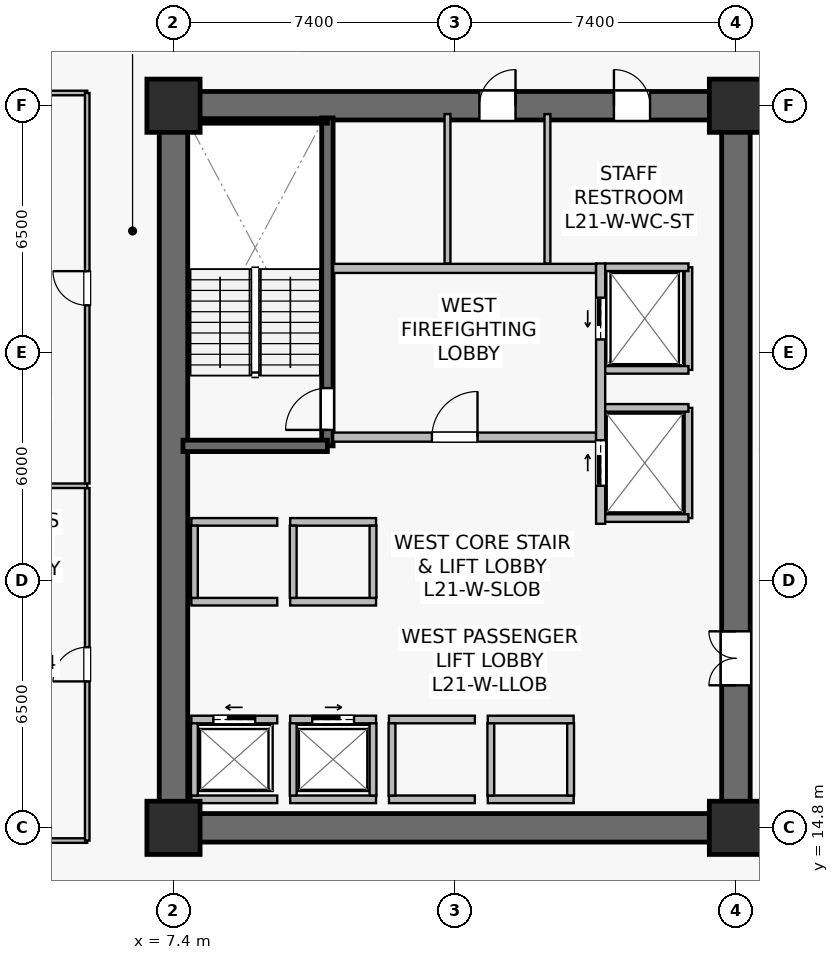
"""IFC4 building model, lengths in metres.
Left out: names, types, materials, properties, quantities, classifications, styles, units other than length and angle.
Written with IfcOpenShell. Run it as: python <this file> out.ifc"""

import sys

from ifc_helpers import new_model, si_unit, direction, frame, frame_2d, origin, origin_2d, place, context, subcontext, project, spatial, rectangle, extrude, source, transform, mapped, element, fill, save


model = new_model("IFC4")
c1 = context("Model", 3, precision=1e-05, world=origin(), true_north=direction((0.0, 1.0)))
c2 = subcontext(c1, "Body", "Model", "MODEL_VIEW")
j1 = project(units=[si_unit("LENGTHUNIT", "METRE"), si_unit("PLANEANGLEUNIT", "RADIAN")], contexts=[c1])
p1 = place(None, origin())
s1 = spatial("IfcSite", under=j1, at=p1, CompositionType="ELEMENT")
p2 = place(p1, origin())
s2 = spatial("IfcBuilding", under=s1, at=p2, CompositionType="ELEMENT")
p3 = place(p2, frame((0.0, 0.0, 86.7)))
s3 = spatial("IfcBuildingStorey", under=s2, at=p3, CompositionType="ELEMENT", Elevation=86.7)
p4 = place(p3, frame((7.025, 14.8, 0.0), z_axis=(0.0, 0.0, 1.0), x_axis=(1.0, 0.0, 0.0)))
e1 = element("IfcWall", 1, at=p4, inside=s3, PredefinedType="SHEAR", context=c2, shape_type="SweptSolid", body=[
    extrude(rectangle(XDim=15.55, YDim=0.75, at=frame_2d((7.775, 0.0))), origin(), (0.0, 0.0, 1.0), 3.78),
])
p5 = place(p3, frame((7.025, 33.8, 0.0), z_axis=(0.0, 0.0, 1.0), x_axis=(1.0, 0.0, 0.0)))
e2 = element("IfcWall", 2, at=p5, inside=s3, PredefinedType="SHEAR", context=c2, shape_type="SweptSolid", body=[
    extrude(rectangle(XDim=15.55, YDim=0.75, at=frame_2d((7.775, 0.0))), origin(), (0.0, 0.0, 1.0), 3.78),
])
p6 = place(p5, frame((8.425, 0.0, 0.0)))
e3 = element("IfcOpeningElement", 3, at=p6, cuts=e2, PredefinedType="OPENING", context=c2, shape_type="SweptSolid", body=[
    extrude(rectangle(XDim=0.95, YDim=2.15, at=frame_2d((0.475, 1.075))), frame((0.0, 0.385, 0.0), z_axis=(0.0, -1.0, 0.0), x_axis=(1.0, 0.0, 0.0)), (0.0, 0.0, 1.0), 0.77),
])
p7 = place(p5, frame((11.965, 0.0, 0.0)))
e4 = element("IfcOpeningElement", 4, at=p7, cuts=e2, PredefinedType="OPENING", context=c2, shape_type="SweptSolid", body=[
    extrude(rectangle(XDim=0.95, YDim=2.15, at=frame_2d((0.475, 1.075))), frame((0.0, 0.385, 0.0), z_axis=(0.0, -1.0, 0.0), x_axis=(1.0, 0.0, 0.0)), (0.0, 0.0, 1.0), 0.77),
])
p8 = place(p3, frame((7.4, 15.175, 0.0), z_axis=(0.0, 0.0, 1.0), x_axis=(0.0, 1.0, 0.0)))
e5 = element("IfcWall", 5, at=p8, inside=s3, PredefinedType="SHEAR", context=c2, shape_type="SweptSolid", body=[
    extrude(rectangle(XDim=18.25, YDim=0.75, at=frame_2d((9.125, 0.0))), origin(), (0.0, 0.0, 1.0), 3.78),
])
p9 = place(p3, frame((22.2, 15.175, 0.0), z_axis=(0.0, 0.0, 1.0), x_axis=(0.0, 1.0, 0.0)))
e6 = element("IfcWall", 6, at=p9, inside=s3, PredefinedType="SHEAR", context=c2, shape_type="SweptSolid", body=[
    extrude(rectangle(XDim=18.25, YDim=0.75, at=frame_2d((9.125, 0.0))), origin(), (0.0, 0.0, 1.0), 3.78),
])
p10 = place(p9, frame((3.375, 0.0, 0.0)))
e7 = element("IfcOpeningElement", 7, at=p10, cuts=e6, PredefinedType="OPENING", context=c2, shape_type="SweptSolid", body=[
    extrude(rectangle(XDim=1.42, YDim=2.2, at=frame_2d((0.71, 1.1))), frame((0.0, 0.385, 0.0), z_axis=(0.0, -1.0, 0.0), x_axis=(1.0, 0.0, 0.0)), (0.0, 0.0, 1.0), 0.77),
])
p11 = place(p3, frame((11.45, 24.85, 0.0), z_axis=(0.0, 0.0, 1.0), x_axis=(0.0, 1.0, 0.0)))
e8 = element("IfcWall", 8, at=p11, inside=s3, PredefinedType="SHEAR", context=c2, shape_type="SweptSolid", body=[
    extrude(rectangle(XDim=8.63, YDim=0.3, at=frame_2d((4.315, 0.0))), origin(), (0.0, 0.0, 1.0), 3.78),
])
p12 = place(p11, frame((0.42, 0.0, 0.0)))
e9 = element("IfcOpeningElement", 9, at=p12, cuts=e8, PredefinedType="OPENING", context=c2, shape_type="SweptSolid", body=[
    extrude(rectangle(XDim=1.1, YDim=2.15, at=frame_2d((0.55, 1.075))), frame((0.0, 0.16, 0.0), z_axis=(0.0, -1.0, 0.0), x_axis=(1.0, 0.0, 0.0)), (0.0, 0.0, 1.0), 0.32),
])
p13 = place(p3, frame((7.65, 24.85, 0.0), z_axis=(0.0, 0.0, 1.0), x_axis=(1.0, 0.0, 0.0)))
e10 = element("IfcWall", 10, at=p13, inside=s3, PredefinedType="SHEAR", context=c2, shape_type="SweptSolid", body=[
    extrude(rectangle(XDim=3.8, YDim=0.3, at=frame_2d((1.9, 0.0))), origin(), (0.0, 0.0, 1.0), 3.78),
])
p14 = place(p3, frame((7.73, 33.4, 0.0), z_axis=(0.0, 0.0, 1.0), x_axis=(1.0, 0.0, 0.0)))
e11 = element("IfcWall", 11, at=p14, inside=s3, PredefinedType="SOLIDWALL", context=c2, shape_type="SweptSolid", body=[
    extrude(rectangle(XDim=3.72, YDim=0.12, at=frame_2d((1.86, 0.0))), origin(), (0.0, 0.0, 1.0), 3.78),
])
m1 = source(origin(), c2, "Body", "SweptSolid", [
    extrude(rectangle(XDim=1.4, YDim=1.4, at=origin_2d()), origin(), (0.0, 0.0, 1.0), 4.1),
])
for number, where, z_axis, x_axis in (
    (12, (7.4, 14.8, 0.0), (0.0, 0.0, 1.0), (1.0, 0.0, 0.0)),
    (13, (22.2, 14.8, 0.0), (0.0, 0.0, 1.0), (1.0, 0.0, 0.0)),
    (14, (7.4, 33.8, 0.0), (0.0, 0.0, 1.0), (1.0, 0.0, 0.0)),
    (15, (22.2, 33.8, 0.0), (0.0, 0.0, 1.0), (1.0, 0.0, 0.0)),
):
    element("IfcColumn", number, at=place(p3, frame(where, z_axis=z_axis, x_axis=x_axis)), inside=s3, PredefinedType="COLUMN", context=c2, shape_type="MappedRepresentation", body=[
        mapped(m1, transform((0.0, 0.0, 0.0), scale=1.0)),
    ])
p15 = place(p3, frame((11.6, 25.08, 0.0), z_axis=(0.0, 0.0, 1.0), x_axis=(1.0, 0.0, 0.0)))
e16 = element("IfcWall", 16, at=p15, inside=s3, PredefinedType="SOLIDWALL", context=c2, shape_type="SweptSolid", body=[
    extrude(rectangle(XDim=6.92, YDim=0.24, at=frame_2d((3.46, 0.0))), origin(), (0.0, 0.0, 1.0), 3.115),
])
p16 = place(p15, frame((2.6, 0.0, 0.0)))
e17 = element("IfcOpeningElement", 17, at=p16, cuts=e16, PredefinedType="OPENING", context=c2, shape_type="SweptSolid", body=[
    extrude(rectangle(XDim=1.2, YDim=2.16, at=frame_2d((0.6, 1.08))), frame((0.0, 0.13, 0.0), z_axis=(0.0, -1.0, 0.0), x_axis=(1.0, 0.0, 0.0)), (0.0, 0.0, 1.0), 0.26),
])
p17 = place(p3, frame((11.6, 29.52, 0.0), z_axis=(0.0, 0.0, 1.0), x_axis=(1.0, 0.0, 0.0)))
e18 = element("IfcWall", 18, at=p17, inside=s3, PredefinedType="SOLIDWALL", context=c2, shape_type="SweptSolid", body=[
    extrude(rectangle(XDim=6.92, YDim=0.24, at=frame_2d((3.46, 0.0))), origin(), (0.0, 0.0, 1.0), 3.115),
])
p18 = place(p3, frame((18.64, 22.8, 0.0), z_axis=(0.0, 0.0, 1.0), x_axis=(0.0, 1.0, 0.0)))
e19 = element("IfcWall", 19, at=p18, inside=s3, PredefinedType="SOLIDWALL", context=c2, shape_type="SweptSolid", body=[
    extrude(rectangle(XDim=6.85, YDim=0.24, at=frame_2d((3.425, 0.0))), origin(), (0.0, 0.0, 1.0), 2.865),
])
p19 = place(p18, frame((4.85, 0.0, 0.0)))
e20 = element("IfcOpeningElement", 20, at=p19, cuts=e19, PredefinedType="OPENING", context=c2, shape_type="SweptSolid", body=[
    extrude(rectangle(XDim=1.1, YDim=2.22, at=frame_2d((0.55, 1.11))), frame((0.0, 0.13, 0.0), z_axis=(0.0, -1.0, 0.0), x_axis=(1.0, 0.0, 0.0)), (0.0, 0.0, 1.0), 0.26),
])
p20 = place(p18, frame((1.0, 0.0, 0.0)))
e21 = element("IfcOpeningElement", 21, at=p20, cuts=e19, PredefinedType="OPENING", context=c2, shape_type="SweptSolid", body=[
    extrude(rectangle(XDim=1.2, YDim=2.22, at=frame_2d((0.6, 1.11))), frame((0.0, 0.13, 0.0), z_axis=(0.0, -1.0, 0.0), x_axis=(1.0, 0.0, 0.0)), (0.0, 0.0, 1.0), 0.26),
])
p21 = place(p3, frame((7.87, 17.65, 0.0), z_axis=(0.0, 0.0, 1.0), x_axis=(1.0, 0.0, 0.0)))
e22 = element("IfcWall", 22, at=p21, inside=s3, PredefinedType="SOLIDWALL", context=c2, shape_type="SweptSolid", body=[
    extrude(rectangle(XDim=2.26, YDim=0.2, at=frame_2d((1.13, 0.0))), origin(), (0.0, 0.0, 1.0), 3.78),
])
p22 = place(p21, frame((0.58, 0.0, 0.0)))
e23 = element("IfcOpeningElement", 23, at=p22, cuts=e22, PredefinedType="OPENING", context=c2, shape_type="SweptSolid", body=[
    extrude(rectangle(XDim=1.1, YDim=2.22, at=frame_2d((0.55, 1.11))), frame((0.0, 0.11, 0.0), z_axis=(0.0, -1.0, 0.0), x_axis=(1.0, 0.0, 0.0)), (0.0, 0.0, 1.0), 0.22),
])
p23 = place(p3, frame((7.87, 15.55, 0.0), z_axis=(0.0, 0.0, 1.0), x_axis=(1.0, 0.0, 0.0)))
e24 = element("IfcWall", 24, at=p23, inside=s3, PredefinedType="SOLIDWALL", context=c2, shape_type="SweptSolid", body=[
    extrude(rectangle(XDim=2.26, YDim=0.2, at=frame_2d((1.13, 0.0))), origin(), (0.0, 0.0, 1.0), 3.78),
])
p24 = place(p3, frame((7.95, 15.65, 0.0), z_axis=(0.0, 0.0, 1.0), x_axis=(0.0, 1.0, 0.0)))
e25 = element("IfcWall", 25, at=p24, inside=s3, PredefinedType="SOLIDWALL", context=c2, shape_type="SweptSolid", body=[
    extrude(rectangle(XDim=1.9, YDim=0.18, at=frame_2d((0.95, 0.0))), origin(), (0.0, 0.0, 1.0), 3.78),
])
p25 = place(p3, frame((10.47, 17.65, 0.0), z_axis=(0.0, 0.0, 1.0), x_axis=(1.0, 0.0, 0.0)))
e26 = element("IfcWall", 26, at=p25, inside=s3, PredefinedType="SOLIDWALL", context=c2, shape_type="SweptSolid", body=[
    extrude(rectangle(XDim=2.26, YDim=0.2, at=frame_2d((1.13, 0.0))), origin(), (0.0, 0.0, 1.0), 3.78),
])
p26 = place(p25, frame((0.58, 0.0, 0.0)))
e27 = element("IfcOpeningElement", 27, at=p26, cuts=e26, PredefinedType="OPENING", context=c2, shape_type="SweptSolid", body=[
    extrude(rectangle(XDim=1.1, YDim=2.22, at=frame_2d((0.55, 1.11))), frame((0.0, 0.11, 0.0), z_axis=(0.0, -1.0, 0.0), x_axis=(1.0, 0.0, 0.0)), (0.0, 0.0, 1.0), 0.22),
])
p27 = place(p3, frame((10.47, 15.55, 0.0), z_axis=(0.0, 0.0, 1.0), x_axis=(1.0, 0.0, 0.0)))
e28 = element("IfcWall", 28, at=p27, inside=s3, PredefinedType="SOLIDWALL", context=c2, shape_type="SweptSolid", body=[
    extrude(rectangle(XDim=2.26, YDim=0.2, at=frame_2d((1.13, 0.0))), origin(), (0.0, 0.0, 1.0), 3.78),
])
for number, where, z_axis, x_axis in (
    (29, (10.55, 15.65, 0.0), (0.0, 0.0, 1.0), (0.0, 1.0, 0.0)),
    (30, (12.65, 15.65, 0.0), (0.0, 0.0, 1.0), (0.0, 1.0, 0.0)),
):
    element("IfcWall", number, at=place(p3, frame(where, z_axis=z_axis, x_axis=x_axis)), inside=s3, PredefinedType="SOLIDWALL", context=c2, shape_type="SweptSolid", body=[
        extrude(rectangle(XDim=1.9, YDim=0.18, at=frame_2d((0.95, 0.0))), origin(), (0.0, 0.0, 1.0), 3.78),
    ])
for number, where, z_axis, x_axis in (
    (31, (13.07, 17.65, 0.0), (0.0, 0.0, 1.0), (1.0, 0.0, 0.0)),
    (32, (13.07, 15.55, 0.0), (0.0, 0.0, 1.0), (1.0, 0.0, 0.0)),
):
    element("IfcWall", number, at=place(p3, frame(where, z_axis=z_axis, x_axis=x_axis)), inside=s3, PredefinedType="SOLIDWALL", context=c2, shape_type="SweptSolid", body=[
        extrude(rectangle(XDim=2.26, YDim=0.2, at=frame_2d((1.13, 0.0))), origin(), (0.0, 0.0, 1.0), 3.115),
    ])
p28 = place(p3, frame((13.15, 15.65, 0.0), z_axis=(0.0, 0.0, 1.0), x_axis=(0.0, 1.0, 0.0)))
e33 = element("IfcWall", 33, at=p28, inside=s3, PredefinedType="SOLIDWALL", context=c2, shape_type="SweptSolid", body=[
    extrude(rectangle(XDim=1.9, YDim=0.18, at=frame_2d((0.95, 0.0))), origin(), (0.0, 0.0, 1.0), 3.78),
])
for number, where, z_axis, x_axis in (
    (34, (15.67, 17.65, 0.0), (0.0, 0.0, 1.0), (1.0, 0.0, 0.0)),
    (35, (15.67, 15.55, 0.0), (0.0, 0.0, 1.0), (1.0, 0.0, 0.0)),
):
    element("IfcWall", number, at=place(p3, frame(where, z_axis=z_axis, x_axis=x_axis)), inside=s3, PredefinedType="SOLIDWALL", context=c2, shape_type="SweptSolid", body=[
        extrude(rectangle(XDim=2.26, YDim=0.2, at=frame_2d((1.13, 0.0))), origin(), (0.0, 0.0, 1.0), 3.78),
    ])
for number, where, z_axis, x_axis in (
    (36, (15.75, 15.65, 0.0), (0.0, 0.0, 1.0), (0.0, 1.0, 0.0)),
    (37, (17.85, 15.65, 0.0), (0.0, 0.0, 1.0), (0.0, 1.0, 0.0)),
):
    element("IfcWall", number, at=place(p3, frame(where, z_axis=z_axis, x_axis=x_axis)), inside=s3, PredefinedType="SOLIDWALL", context=c2, shape_type="SweptSolid", body=[
        extrude(rectangle(XDim=1.9, YDim=0.18, at=frame_2d((0.95, 0.0))), origin(), (0.0, 0.0, 1.0), 3.78),
    ])
for number, where, z_axis, x_axis in (
    (38, (7.87, 20.75, 0.0), (0.0, 0.0, 1.0), (1.0, 0.0, 0.0)),
    (39, (7.87, 22.85, 0.0), (0.0, 0.0, 1.0), (1.0, 0.0, 0.0)),
):
    element("IfcWall", number, at=place(p3, frame(where, z_axis=z_axis, x_axis=x_axis)), inside=s3, PredefinedType="SOLIDWALL", context=c2, shape_type="SweptSolid", body=[
        extrude(rectangle(XDim=2.26, YDim=0.2, at=frame_2d((1.13, 0.0))), origin(), (0.0, 0.0, 1.0), 3.78),
    ])
p29 = place(p3, frame((7.95, 20.85, 0.0), z_axis=(0.0, 0.0, 1.0), x_axis=(0.0, 1.0, 0.0)))
e40 = element("IfcWall", 40, at=p29, inside=s3, PredefinedType="SOLIDWALL", context=c2, shape_type="SweptSolid", body=[
    extrude(rectangle(XDim=1.9, YDim=0.18, at=frame_2d((0.95, 0.0))), origin(), (0.0, 0.0, 1.0), 3.78),
])
for number, where, z_axis, x_axis in (
    (41, (10.47, 20.75, 0.0), (0.0, 0.0, 1.0), (1.0, 0.0, 0.0)),
    (42, (10.47, 22.85, 0.0), (0.0, 0.0, 1.0), (1.0, 0.0, 0.0)),
):
    element("IfcWall", number, at=place(p3, frame(where, z_axis=z_axis, x_axis=x_axis)), inside=s3, PredefinedType="SOLIDWALL", context=c2, shape_type="SweptSolid", body=[
        extrude(rectangle(XDim=2.26, YDim=0.2, at=frame_2d((1.13, 0.0))), origin(), (0.0, 0.0, 1.0), 3.78),
    ])
for number, where, z_axis, x_axis in (
    (43, (10.55, 20.85, 0.0), (0.0, 0.0, 1.0), (0.0, 1.0, 0.0)),
    (44, (12.65, 20.85, 0.0), (0.0, 0.0, 1.0), (0.0, 1.0, 0.0)),
):
    element("IfcWall", number, at=place(p3, frame(where, z_axis=z_axis, x_axis=x_axis)), inside=s3, PredefinedType="SOLIDWALL", context=c2, shape_type="SweptSolid", body=[
        extrude(rectangle(XDim=1.9, YDim=0.18, at=frame_2d((0.95, 0.0))), origin(), (0.0, 0.0, 1.0), 3.78),
    ])
p30 = place(p3, frame((20.95, 26.85, 0.0), z_axis=(0.0, 0.0, 1.0), x_axis=(0.0, 1.0, 0.0)))
e45 = element("IfcWall", 45, at=p30, inside=s3, PredefinedType="SOLIDWALL", context=c2, shape_type="SweptSolid", body=[
    extrude(rectangle(XDim=2.7, YDim=0.2, at=frame_2d((1.35, 0.0))), origin(), (0.0, 0.0, 1.0), 3.78),
])
p31 = place(p3, frame((18.76, 29.55, 0.0), z_axis=(0.0, 0.0, 1.0), x_axis=(1.0, 0.0, 0.0)))
e46 = element("IfcWall", 46, at=p31, inside=s3, PredefinedType="SOLIDWALL", context=c2, shape_type="SweptSolid", body=[
    extrude(rectangle(XDim=2.19, YDim=0.2, at=frame_2d((1.095, 0.0))), origin(), (0.0, 0.0, 1.0), 3.78),
])
p32 = place(p3, frame((18.76, 26.85, 0.0), z_axis=(0.0, 0.0, 1.0), x_axis=(1.0, 0.0, 0.0)))
e47 = element("IfcWall", 47, at=p32, inside=s3, PredefinedType="SOLIDWALL", context=c2, shape_type="SweptSolid", body=[
    extrude(rectangle(XDim=2.19, YDim=0.2, at=frame_2d((1.095, 0.0))), origin(), (0.0, 0.0, 1.0), 3.177),
])
p33 = place(p3, frame((20.95, 22.95, 0.0), z_axis=(0.0, 0.0, 1.0), x_axis=(0.0, 1.0, 0.0)))
e48 = element("IfcWall", 48, at=p33, inside=s3, PredefinedType="SOLIDWALL", context=c2, shape_type="SweptSolid", body=[
    extrude(rectangle(XDim=2.9, YDim=0.2, at=frame_2d((1.45, 0.0))), origin(), (0.0, 0.0, 1.0), 2.865),
])
for number, where, z_axis, x_axis in (
    (49, (18.76, 25.85, 0.0), (0.0, 0.0, 1.0), (1.0, 0.0, 0.0)),
    (50, (18.76, 22.95, 0.0), (0.0, 0.0, 1.0), (1.0, 0.0, 0.0)),
):
    element("IfcWall", number, at=place(p3, frame(where, z_axis=z_axis, x_axis=x_axis)), inside=s3, PredefinedType="SOLIDWALL", context=c2, shape_type="SweptSolid", body=[
        extrude(rectangle(XDim=2.19, YDim=0.2, at=frame_2d((1.095, 0.0))), origin(), (0.0, 0.0, 1.0), 3.78),
    ])
p34 = place(p3, frame((14.61, 29.65, 0.0), z_axis=(0.0, 0.0, 1.0), x_axis=(0.0, 1.0, 0.0)))
e51 = element("IfcWall", 51, at=p34, inside=s3, PredefinedType="PLUMBINGWALL", context=c2, shape_type="SweptSolid", body=[
    extrude(rectangle(XDim=3.93, YDim=0.155, at=frame_2d((1.965, 0.0))), origin(), (0.0, 0.0, 1.0), 3.115),
])
p35 = place(p3, frame((17.24, 29.65, 0.0), z_axis=(0.0, 0.0, 1.0), x_axis=(0.0, 1.0, 0.0)))
e52 = element("IfcWall", 52, at=p35, inside=s3, PredefinedType="PLUMBINGWALL", context=c2, shape_type="SweptSolid", body=[
    extrude(rectangle(XDim=3.93, YDim=0.155, at=frame_2d((1.965, 0.0))), origin(), (0.0, 0.0, 1.0), 3.78),
])
for number, where, z_axis, x_axis in (
    (53, (0.11, 14.465, 0.0), (0.0, 0.0, 1.0), (1.0, 0.0, 0.0)),
    (54, (0.11, 34.135, 0.0), (0.0, 0.0, 1.0), (1.0, 0.0, 0.0)),
):
    element("IfcWall", number, at=place(p3, frame(where, z_axis=z_axis, x_axis=x_axis)), inside=s3, PredefinedType="PARTITIONING", context=c2, shape_type="SweptSolid", body=[
        extrude(rectangle(XDim=5.02, YDim=0.12, at=frame_2d((2.51, 0.0))), origin(), (0.0, 0.0, 1.0), 3.78),
    ])
p36 = place(p3, frame((5.13, 14.465, 0.0), z_axis=(0.0, 0.0, 1.0), x_axis=(0.0, 1.0, 0.0)))
e55 = element("IfcWall", 55, at=p36, inside=s3, PredefinedType="PARTITIONING", context=c2, shape_type="SweptSolid", body=[
    extrude(rectangle(XDim=9.275, YDim=0.12, at=frame_2d((4.637, 0.0))), origin(), (0.0, 0.0, 1.0), 3.78),
])
p37 = place(p36, frame((4.188, 0.0, 0.0)))
e56 = element("IfcOpeningElement", 56, at=p37, cuts=e55, PredefinedType="OPENING", context=c2, shape_type="SweptSolid", body=[
    extrude(rectangle(XDim=0.9, YDim=2.1, at=frame_2d((0.45, 1.05))), frame((0.0, 0.07, 0.0), z_axis=(0.0, -1.0, 0.0), x_axis=(1.0, 0.0, 0.0)), (0.0, 0.0, 1.0), 0.14),
])
p38 = place(p3, frame((0.11, 23.8, 0.0), z_axis=(0.0, 0.0, 1.0), x_axis=(1.0, 0.0, 0.0)))
e57 = element("IfcWall", 57, at=p38, inside=s3, PredefinedType="PARTITIONING", context=c2, shape_type="SweptSolid", body=[
    extrude(rectangle(XDim=5.02, YDim=0.12, at=frame_2d((2.51, 0.0))), origin(), (0.0, 0.0, 1.0), 3.78),
])
p39 = place(p3, frame((5.13, 23.86, 0.0), z_axis=(0.0, 0.0, 1.0), x_axis=(0.0, 1.0, 0.0)))
e58 = element("IfcWall", 58, at=p39, inside=s3, PredefinedType="PARTITIONING", context=c2, shape_type="SweptSolid", body=[
    extrude(rectangle(XDim=10.275, YDim=0.12, at=frame_2d((5.137, 0.0))), origin(), (0.0, 0.0, 1.0), 3.78),
])
p40 = place(p39, frame((4.688, 0.0, 0.0)))
e59 = element("IfcOpeningElement", 59, at=p40, cuts=e58, PredefinedType="OPENING", context=c2, shape_type="SweptSolid", body=[
    extrude(rectangle(XDim=0.9, YDim=2.1, at=frame_2d((0.45, 1.05))), frame((0.0, 0.07, 0.0), z_axis=(0.0, -1.0, 0.0), x_axis=(1.0, 0.0, 0.0)), (0.0, 0.0, 1.0), 0.14),
])
m2 = source(origin(), c2, "Body", "SweptSolid", [
    extrude(rectangle(XDim=1.1, YDim=2.15, at=frame_2d((0.55, 1.075))), frame((0.0, 0.025, 0.0), z_axis=(0.0, -1.0, 0.0), x_axis=(1.0, 0.0, 0.0)), (0.0, 0.0, 1.0), 0.05),
])
p41 = place(p12, origin())
e60 = element("IfcDoor", 60, at=p41, inside=s3, OperationType="SINGLE_SWING_LEFT", PredefinedType="DOOR", context=c2, shape_type="MappedRepresentation", body=[
    mapped(m2, transform((0.0, 0.0, 0.0), scale=1.0)),
])
fill(e9, e60)
m3 = source(origin(), c2, "Body", "SweptSolid", [
    extrude(rectangle(XDim=1.2, YDim=2.16, at=frame_2d((0.6, 1.08))), frame((0.0, 0.025, 0.0), z_axis=(0.0, -1.0, 0.0), x_axis=(1.0, 0.0, 0.0)), (0.0, 0.0, 1.0), 0.05),
])
p42 = place(p16, origin())
e61 = element("IfcDoor", 61, at=p42, inside=s3, OperationType="SINGLE_SWING_RIGHT", PredefinedType="DOOR", context=c2, shape_type="MappedRepresentation", body=[
    mapped(m3, transform((0.0, 0.0, 0.0), scale=1.0)),
])
fill(e17, e61)
m4 = source(origin(), c2, "Body", "SweptSolid", [
    extrude(rectangle(XDim=1.1, YDim=2.22, at=frame_2d((0.55, 1.11))), frame((0.0, 0.025, 0.0), z_axis=(0.0, -1.0, 0.0), x_axis=(1.0, 0.0, 0.0)), (0.0, 0.0, 1.0), 0.05),
])
p43 = place(p22, origin())
e62 = element("IfcDoor", 62, at=p43, inside=s3, OperationType="SLIDING_TO_LEFT", PredefinedType="USERDEFINED", context=c2, shape_type="MappedRepresentation", body=[
    mapped(m4, transform((0.0, 0.0, 0.0), scale=1.0)),
])
fill(e23, e62)
p44 = place(p26, origin())
e63 = element("IfcDoor", 63, at=p44, inside=s3, OperationType="SLIDING_TO_RIGHT", PredefinedType="USERDEFINED", context=c2, shape_type="MappedRepresentation", body=[
    mapped(m4, transform((0.0, 0.0, 0.0), scale=1.0)),
])
fill(e27, e63)
p45 = place(p19, origin())
e64 = element("IfcDoor", 64, at=p45, inside=s3, OperationType="SLIDING_TO_LEFT", PredefinedType="USERDEFINED", context=c2, shape_type="MappedRepresentation", body=[
    mapped(m4, transform((0.0, 0.0, 0.0), scale=1.0)),
])
fill(e20, e64)
m5 = source(origin(), c2, "Body", "SweptSolid", [
    extrude(rectangle(XDim=1.2, YDim=2.22, at=frame_2d((0.6, 1.11))), frame((0.0, 0.025, 0.0), z_axis=(0.0, -1.0, 0.0), x_axis=(1.0, 0.0, 0.0)), (0.0, 0.0, 1.0), 0.05),
])
p46 = place(p20, origin())
e65 = element("IfcDoor", 65, at=p46, inside=s3, OperationType="SLIDING_TO_RIGHT", PredefinedType="USERDEFINED", context=c2, shape_type="MappedRepresentation", body=[
    mapped(m5, transform((0.0, 0.0, 0.0), scale=1.0)),
])
fill(e21, e65)
m6 = source(origin(), c2, "Body", "SweptSolid", [
    extrude(rectangle(XDim=1.42, YDim=2.2, at=frame_2d((0.71, 1.1))), frame((0.0, 0.025, 0.0), z_axis=(0.0, -1.0, 0.0), x_axis=(1.0, 0.0, 0.0)), (0.0, 0.0, 1.0), 0.05),
])
p47 = place(p10, origin())
e66 = element("IfcDoor", 66, at=p47, inside=s3, OperationType="DOUBLE_DOOR_SINGLE_SWING", PredefinedType="DOOR", context=c2, shape_type="MappedRepresentation", body=[
    mapped(m6, transform((0.0, 0.0, 0.0), scale=1.0)),
])
fill(e7, e66)
m7 = source(origin(), c2, "Body", "SweptSolid", [
    extrude(rectangle(XDim=0.95, YDim=2.15, at=frame_2d((0.475, 1.075))), frame((0.0, 0.025, 0.0), z_axis=(0.0, -1.0, 0.0), x_axis=(1.0, 0.0, 0.0)), (0.0, 0.0, 1.0), 0.05),
])
p48 = place(p6, origin())
e67 = element("IfcDoor", 67, at=p48, inside=s3, OperationType="SINGLE_SWING_RIGHT", PredefinedType="DOOR", context=c2, shape_type="MappedRepresentation", body=[
    mapped(m7, transform((0.0, 0.0, 0.0), scale=1.0)),
])
fill(e3, e67)
p49 = place(p7, origin())
e68 = element("IfcDoor", 68, at=p49, inside=s3, OperationType="SINGLE_SWING_LEFT", PredefinedType="DOOR", context=c2, shape_type="MappedRepresentation", body=[
    mapped(m7, transform((0.0, 0.0, 0.0), scale=1.0)),
])
fill(e4, e68)
m8 = source(origin(), c2, "Body", "SweptSolid", [
    extrude(rectangle(XDim=0.9, YDim=2.1, at=frame_2d((0.45, 1.05))), frame((0.0, 0.025, 0.0), z_axis=(0.0, -1.0, 0.0), x_axis=(1.0, 0.0, 0.0)), (0.0, 0.0, 1.0), 0.05),
])
p50 = place(p37, origin())
e69 = element("IfcDoor", 69, at=p50, inside=s3, OperationType="SINGLE_SWING_LEFT", PredefinedType="DOOR", context=c2, shape_type="MappedRepresentation", body=[
    mapped(m8, transform((0.0, 0.0, 0.0), scale=1.0)),
])
fill(e56, e69)
p51 = place(p40, origin())
e70 = element("IfcDoor", 70, at=p51, inside=s3, OperationType="SINGLE_SWING_RIGHT", PredefinedType="DOOR", context=c2, shape_type="MappedRepresentation", body=[
    mapped(m8, transform((0.0, 0.0, 0.0), scale=1.0)),
])
fill(e59, e70)
save(model, sys.argv[1])
